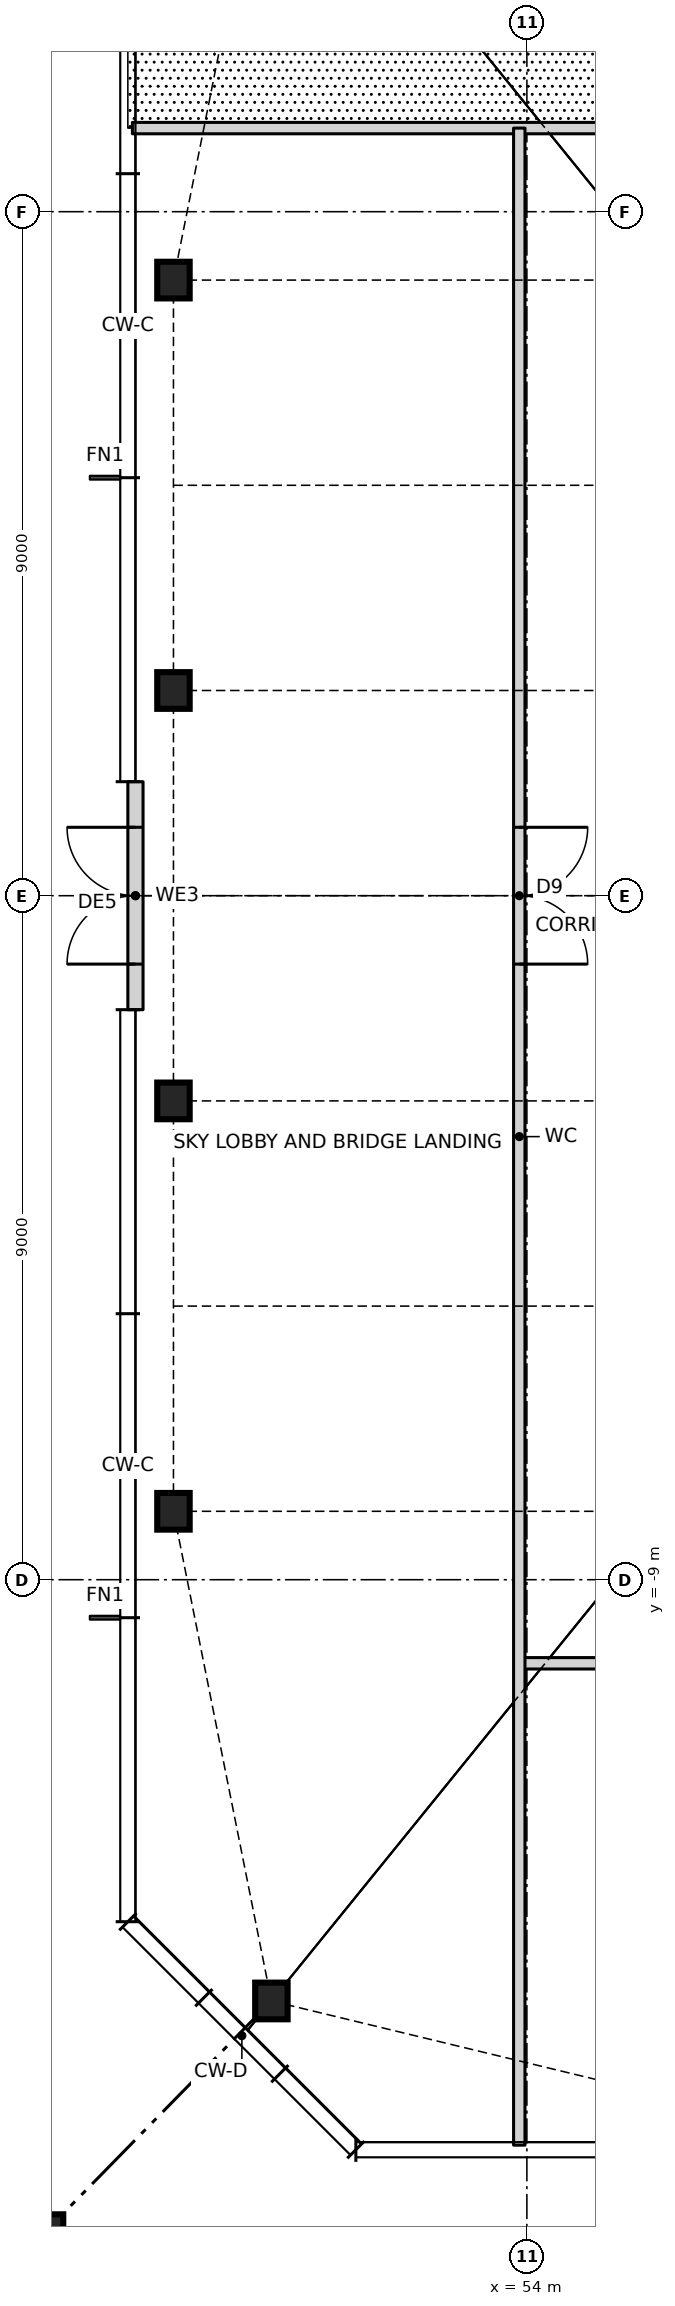
"""IFC4 building model, lengths in metres.
Left out: names, types, materials, properties, quantities, classifications, styles, units other than length and angle.
Written with IfcOpenShell. Run it as: python <this file> out.ifc"""

import sys

from ifc_helpers import new_model, si_unit, direction, frame, frame_2d, origin, origin_2d, place, context, subcontext, project, spatial, rectangle, hollow_rectangle, i_section, extrude, element, fill, save


model = new_model("IFC4")
c1 = context("Model", 3, precision=1e-05, world=origin(), true_north=direction((0.0, 1.0)))
c2 = subcontext(c1, "Body", "Model", "MODEL_VIEW")
j1 = project(units=[si_unit("LENGTHUNIT", "METRE"), si_unit("PLANEANGLEUNIT", "RADIAN")], contexts=[c1])
p1 = place(None, origin())
s1 = spatial("IfcSite", under=j1, at=p1, CompositionType="ELEMENT")
p2 = place(p1, origin())
s2 = spatial("IfcBuilding", under=s1, at=p2, CompositionType="ELEMENT")
p3 = place(p2, frame((0.0, 0.0, 98.0)))
s3 = spatial("IfcBuildingStorey", under=s2, at=p3, CompositionType="ELEMENT", Elevation=98.0)
for number, where, z_axis, x_axis in (
    (1, (50.639, -14.543, 0.0), (0.0, 0.0, 1.0), (1.0, 0.0, 0.0)),
    (2, (49.35, 8.1, 0.0), (0.0, 0.0, 1.0), (1.0, 0.0, 0.0)),
    (3, (49.35, 2.7, 0.0), (0.0, 0.0, 1.0), (1.0, 0.0, 0.0)),
    (4, (49.35, -2.7, 0.0), (0.0, 0.0, 1.0), (1.0, 0.0, 0.0)),
    (5, (49.35, -8.1, 0.0), (0.0, 0.0, 1.0), (1.0, 0.0, 0.0)),
):
    element("IfcColumn", number, at=place(p3, frame(where, z_axis=z_axis, x_axis=x_axis)), inside=s3, PredefinedType="COLUMN", context=c2, shape_type="SweptSolid", body=[
        extrude(i_section(OverallWidth=0.427, OverallDepth=0.483, WebThickness=0.051, FlangeThickness=0.082, at=origin_2d()), origin(), (0.0, 0.0, 1.0), 3.5),
    ])
p4 = place(p3, frame((47.35, -17.9, 0.0), z_axis=(0.0, 0.0, 1.0), x_axis=(1.0, 0.0, 0.0)))
e6 = element("IfcColumn", 6, at=p4, inside=s3, PredefinedType="COLUMN", context=c2, shape_type="SweptSolid", body=[
    extrude(hollow_rectangle(XDim=1.1, YDim=1.1, WallThickness=0.06, at=origin_2d()), origin(), (0.0, 0.0, 1.0), 3.5),
])
p5 = place(p3, frame((48.85, 1.5, 0.0), z_axis=(0.0, 0.0, 1.0), x_axis=(0.0, -1.0, 0.0)))
e7 = element("IfcWall", 7, at=p5, inside=s3, PredefinedType="SOLIDWALL", context=c2, shape_type="SweptSolid", body=[
    extrude(rectangle(XDim=3.0, YDim=0.2, at=frame_2d((1.5, 0.0))), origin(), (0.0, 0.0, 1.0), 3.27),
])
p6 = place(p5, frame((0.6, 0.0, 0.0)))
e8 = element("IfcOpeningElement", 8, at=p6, cuts=e7, PredefinedType="OPENING", context=c2, shape_type="SweptSolid", body=[
    extrude(rectangle(XDim=1.8, YDim=2.4, at=frame_2d((0.9, 1.2))), frame((0.0, 0.11, 0.0), z_axis=(0.0, -1.0, 0.0), x_axis=(1.0, 0.0, 0.0)), (0.0, 0.0, 1.0), 0.22),
])
p7 = place(p3, frame((53.9, -10.1, 0.0), z_axis=(0.0, 0.0, 1.0), x_axis=(1.0, 0.0, 0.0)))
e9 = element("IfcWall", 9, at=p7, inside=s3, PredefinedType="PARTITIONING", context=c2, shape_type="SweptSolid", body=[
    extrude(rectangle(XDim=23.29, YDim=0.15, at=frame_2d((11.645, 0.0))), origin(), (0.0, 0.0, 1.0), 3.27),
])
p8 = place(p7, frame((8.2, 0.0, 0.0)))
e10 = element("IfcOpeningElement", 10, at=p8, cuts=e9, PredefinedType="OPENING", context=c2, shape_type="SweptSolid", body=[
    extrude(rectangle(XDim=1.8, YDim=2.1, at=frame_2d((0.9, 1.05))), frame((0.0, 0.085, 0.0), z_axis=(0.0, -1.0, 0.0), x_axis=(1.0, 0.0, 0.0)), (0.0, 0.0, 1.0), 0.17),
])
p9 = place(p3, frame((48.81, 10.1, 0.0), z_axis=(0.0, 0.0, 1.0), x_axis=(1.0, 0.0, 0.0)))
e11 = element("IfcWall", 11, at=p9, inside=s3, PredefinedType="PARTITIONING", context=c2, shape_type="SweptSolid", body=[
    extrude(rectangle(XDim=23.29, YDim=0.15, at=frame_2d((11.645, 0.0))), origin(), (0.0, 0.0, 1.0), 3.27),
])
p10 = place(p9, frame((13.29, 0.0, 0.0)))
e12 = element("IfcOpeningElement", 12, at=p10, cuts=e11, PredefinedType="OPENING", context=c2, shape_type="SweptSolid", body=[
    extrude(rectangle(XDim=1.8, YDim=2.1, at=frame_2d((0.9, 1.05))), frame((0.0, 0.085, 0.0), z_axis=(0.0, -1.0, 0.0), x_axis=(1.0, 0.0, 0.0)), (0.0, 0.0, 1.0), 0.17),
])
p11 = place(p3, frame((53.9, -16.44, 0.0), z_axis=(0.0, 0.0, 1.0), x_axis=(0.0, 1.0, 0.0)))
e13 = element("IfcWall", 13, at=p11, inside=s3, PredefinedType="PARTITIONING", context=c2, shape_type="SweptSolid", body=[
    extrude(rectangle(XDim=26.54, YDim=0.15, at=frame_2d((13.27, 0.0))), origin(), (0.0, 0.0, 1.0), 3.27),
])
p12 = place(p11, frame((15.54, 0.0, 0.0)))
e14 = element("IfcOpeningElement", 14, at=p12, cuts=e13, PredefinedType="OPENING", context=c2, shape_type="SweptSolid", body=[
    extrude(rectangle(XDim=1.8, YDim=2.1, at=frame_2d((0.9, 1.05))), frame((0.0, 0.085, 0.0), z_axis=(0.0, -1.0, 0.0), x_axis=(1.0, 0.0, 0.0)), (0.0, 0.0, 1.0), 0.17),
])
p13 = place(p6, frame((1.8, 0.0, 0.0), z_axis=(0.0, 0.0, 1.0), x_axis=(-1.0, 0.0, 0.0)))
e15 = element("IfcDoor", 15, at=p13, inside=s3, OperationType="DOUBLE_DOOR_SINGLE_SWING", PredefinedType="DOOR", context=c2, shape_type="SweptSolid", body=[
    extrude(rectangle(XDim=1.8, YDim=2.4, at=frame_2d((0.9, 1.2))), frame((0.0, 0.025, 0.0), z_axis=(0.0, -1.0, 0.0), x_axis=(1.0, 0.0, 0.0)), (0.0, 0.0, 1.0), 0.05),
])
fill(e8, e15)
p14 = place(p12, frame((1.8, 0.0, 0.0), z_axis=(0.0, 0.0, 1.0), x_axis=(-1.0, 0.0, 0.0)))
e16 = element("IfcDoor", 16, at=p14, inside=s3, OperationType="DOUBLE_DOOR_SINGLE_SWING", PredefinedType="DOOR", context=c2, shape_type="SweptSolid", body=[
    extrude(rectangle(XDim=1.8, YDim=2.1, at=frame_2d((0.9, 1.05))), frame((0.0, 0.025, 0.0), z_axis=(0.0, -1.0, 0.0), x_axis=(1.0, 0.0, 0.0)), (0.0, 0.0, 1.0), 0.05),
])
fill(e14, e16)
save(model, sys.argv[1])
